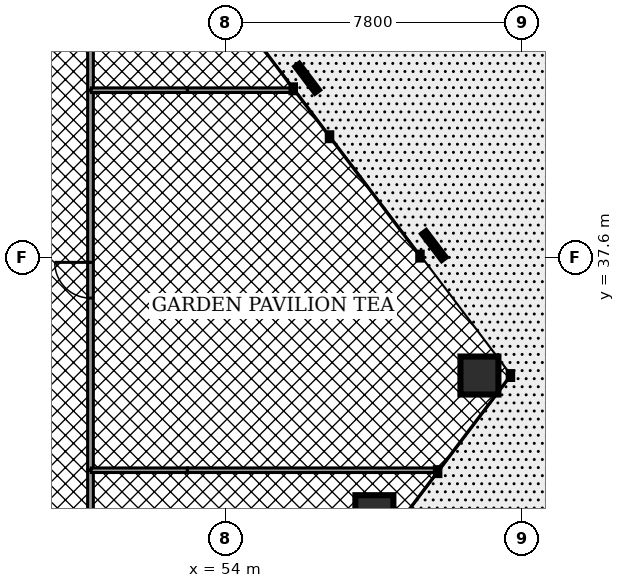
"""IFC4 building model, lengths in metres.
Left out: names, types, materials, properties, quantities, classifications, styles, units other than length and angle.
Written with IfcOpenShell. Run it as: python <this file> out.ifc"""

import sys

from ifc_helpers import new_model, si_unit, direction, frame, frame_2d, origin, origin_2d, place, context, subcontext, project, spatial, rectangle, hollow_rectangle, extrude, element, fill, save


model = new_model("IFC4")
c1 = context("Model", 3, precision=1e-05, world=origin(), true_north=direction((0.0, 1.0)))
c2 = subcontext(c1, "Body", "Model", "MODEL_VIEW")
j1 = project(units=[si_unit("LENGTHUNIT", "METRE"), si_unit("PLANEANGLEUNIT", "RADIAN")], contexts=[c1])
p1 = place(None, origin())
s1 = spatial("IfcSite", under=j1, at=p1, CompositionType="ELEMENT")
p2 = place(p1, origin())
s2 = spatial("IfcBuilding", under=s1, at=p2, CompositionType="ELEMENT")
p3 = place(p2, frame((0.0, 0.0, 22.78)))
s3 = spatial("IfcBuildingStorey", under=s2, at=p3, CompositionType="ELEMENT", Elevation=22.78)
p4 = place(p3, frame((57.92, 30.843, 0.0), z_axis=(0.000325435129, 0.022943176627, 0.99973671771), x_axis=(-0.999899416616, 0.014182970448, 0.0)))
e1 = element("IfcColumn", 1, at=p4, inside=s3, PredefinedType="COLUMN", context=c2, shape_type="SweptSolid", body=[
    extrude(hollow_rectangle(XDim=1.0, YDim=1.0, WallThickness=0.05, at=origin_2d()), origin(), (0.0, 0.0, 1.0), 4.501),
])
p5 = place(p3, frame((60.685, 34.492, 0.0), z_axis=(0.009271357768, 0.034699818545, 0.999354774101), x_axis=(-0.966109551859, 0.258132395887, 0.0)))
e2 = element("IfcColumn", 2, at=p5, inside=s3, PredefinedType="COLUMN", context=c2, shape_type="SweptSolid", body=[
    extrude(hollow_rectangle(XDim=1.0, YDim=1.0, WallThickness=0.05, at=origin_2d()), origin(), (0.0, 0.0, 1.0), 4.503),
])
p6 = place(p3, frame((50.45, 30.17, 0.0), z_axis=(0.0, 0.0, 1.0), x_axis=(0.0, 1.0, 0.0)))
e3 = element("IfcWall", 3, at=p6, inside=s3, PredefinedType="PARTITIONING", context=c2, shape_type="SweptSolid", body=[
    extrude(rectangle(XDim=1.825, YDim=0.15, at=frame_2d((0.913, 0.0))), origin(), (0.0, 0.0, 1.0), 3.457),
])
p7 = place(p3, frame((50.45, 32.005, 0.0), z_axis=(0.0, 0.0, 1.0), x_axis=(0.0, 1.0, 0.0)))
e4 = element("IfcWall", 4, at=p7, inside=s3, PredefinedType="PARTITIONING", context=c2, shape_type="SweptSolid", body=[
    extrude(rectangle(XDim=9.99, YDim=0.15, at=frame_2d((4.995, 0.0))), origin(), (0.0, 0.0, 1.0), 3.457),
])
p8 = place(p7, frame((4.525, 0.0, 0.0)))
e5 = element("IfcOpeningElement", 5, at=p8, cuts=e4, PredefinedType="OPENING", context=c2, shape_type="SweptSolid", body=[
    extrude(rectangle(XDim=0.94, YDim=2.05, at=frame_2d((0.47, 1.025))), frame((0.0, 0.085, 0.0), z_axis=(0.0, -1.0, 0.0), x_axis=(1.0, 0.0, 0.0)), (0.0, 0.0, 1.0), 0.17),
])
p9 = place(p3, frame((50.45, 42.005, 0.0), z_axis=(0.0, 0.0, 1.0), x_axis=(0.0, 1.0, 0.0)))
e6 = element("IfcWall", 6, at=p9, inside=s3, PredefinedType="PARTITIONING", context=c2, shape_type="SweptSolid", body=[
    extrude(rectangle(XDim=1.945, YDim=0.15, at=frame_2d((0.973, 0.0))), origin(), (0.0, 0.0, 1.0), 3.457),
])
p10 = place(p3, frame((50.47, 32.0, 0.0), z_axis=(0.0, 0.0, 1.0), x_axis=(1.0, 0.0, 0.0)))
e7 = element("IfcWall", 7, at=p10, inside=s3, PredefinedType="PARTITIONING", context=c2, shape_type="SweptSolid", body=[
    extrude(rectangle(XDim=2.53, YDim=0.12, at=frame_2d((1.265, 0.0))), origin(), (0.0, 0.0, 1.0), 3.457),
])
p11 = place(p3, frame((53.0, 32.0, 0.0), z_axis=(0.0, 0.0, 1.0), x_axis=(1.0, 0.0, 0.0)))
e8 = element("IfcWall", 8, at=p11, inside=s3, PredefinedType="PARTITIONING", context=c2, shape_type="SweptSolid", body=[
    extrude(rectangle(XDim=6.597, YDim=0.12, at=frame_2d((3.299, 0.0))), origin(), (0.0, 0.0, 1.0), 3.457),
])
p12 = place(p3, frame((50.47, 42.0, 0.0), z_axis=(0.0, 0.0, 1.0), x_axis=(1.0, 0.0, 0.0)))
e9 = element("IfcWall", 9, at=p12, inside=s3, PredefinedType="PARTITIONING", context=c2, shape_type="SweptSolid", body=[
    extrude(rectangle(XDim=2.53, YDim=0.12, at=frame_2d((1.265, 0.0))), origin(), (0.0, 0.0, 1.0), 3.457),
])
p13 = place(p3, frame((53.0, 42.0, 0.0), z_axis=(0.0, 0.0, 1.0), x_axis=(1.0, 0.0, 0.0)))
e10 = element("IfcWall", 10, at=p13, inside=s3, PredefinedType="PARTITIONING", context=c2, shape_type="SweptSolid", body=[
    extrude(rectangle(XDim=2.797, YDim=0.12, at=frame_2d((1.398, 0.0))), origin(), (0.0, 0.0, 1.0), 3.457),
])
p14 = place(p8, origin())
e11 = element("IfcDoor", 11, at=p14, inside=s3, OperationType="SINGLE_SWING_RIGHT", PredefinedType="DOOR", context=c2, shape_type="SweptSolid", body=[
    extrude(rectangle(XDim=0.94, YDim=2.05, at=frame_2d((0.47, 1.025))), frame((0.0, 0.025, 0.0), z_axis=(0.0, -1.0, 0.0), x_axis=(1.0, 0.0, 0.0)), (0.0, 0.0, 1.0), 0.05),
])
fill(e5, e11)
save(model, sys.argv[1])
